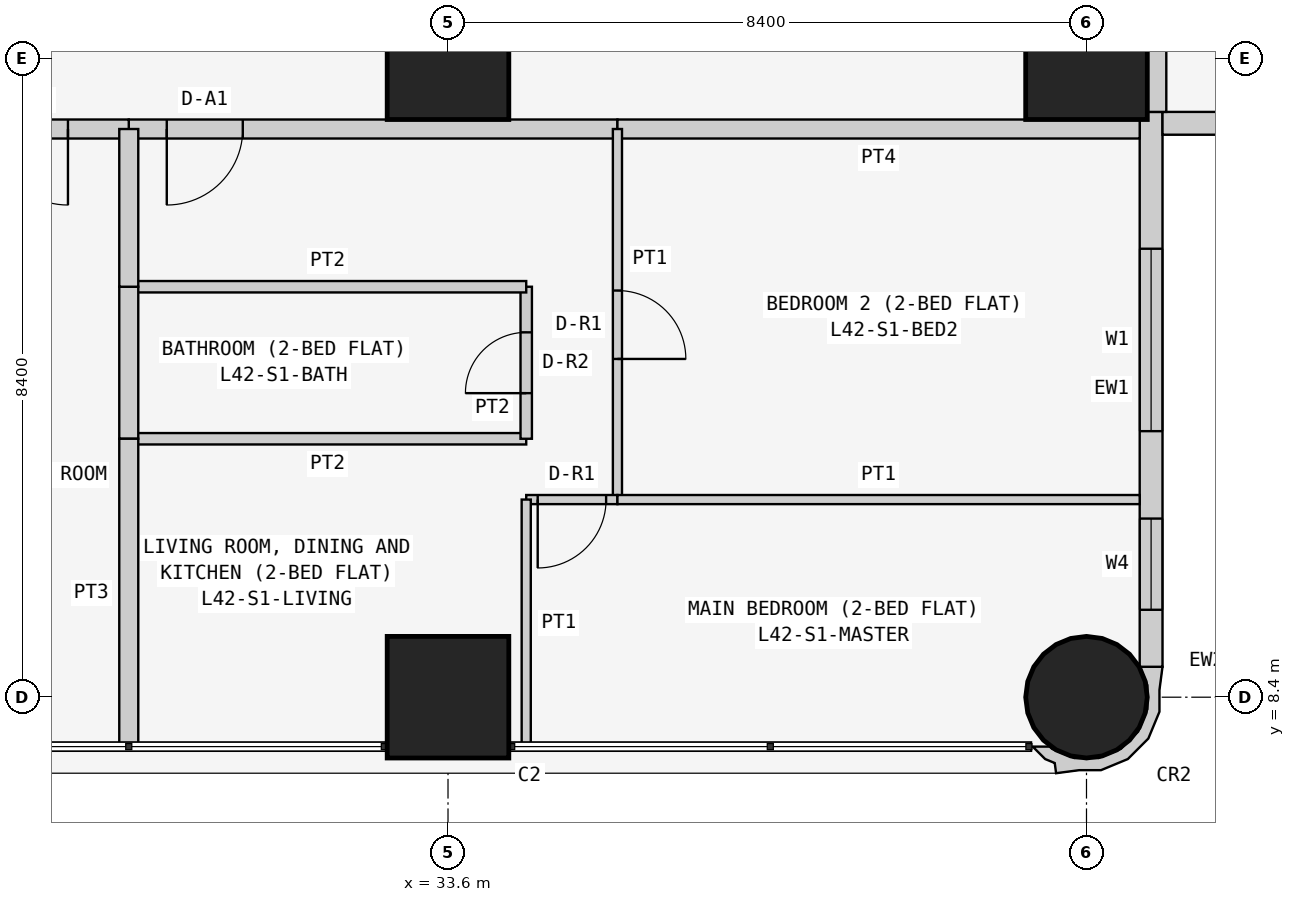
"""IFC4 building model, lengths in metres.
Left out: names, types, materials, properties, quantities, classifications, styles, units other than length and angle.
Written with IfcOpenShell. Run it as: python <this file> out.ifc"""

import sys

from ifc_helpers import new_model, si_unit, direction, frame, frame_2d, origin, origin_2d, place, context, subcontext, project, spatial, polyline, rectangle, circle, outline, extrude, element, fill, save


model = new_model("IFC4")
c1 = context("Model", 3, precision=1e-05, world=origin(), true_north=direction((0.0, 1.0)))
c2 = subcontext(c1, "Body", "Model", "MODEL_VIEW")
j1 = project(units=[si_unit("LENGTHUNIT", "METRE"), si_unit("PLANEANGLEUNIT", "RADIAN")], contexts=[c1])
p1 = place(None, origin())
s1 = spatial("IfcSite", under=j1, at=p1, CompositionType="ELEMENT")
p2 = place(p1, origin())
s2 = spatial("IfcBuilding", under=s1, at=p2, CompositionType="ELEMENT")
p3 = place(p2, frame((0.0, 0.0, 162.9)))
s3 = spatial("IfcBuildingStorey", under=s2, at=p3, CompositionType="ELEMENT", Elevation=162.9)
for number, where, z_axis, x_axis in (
    (1, (33.6, 8.4, 0.0), (0.0, 0.0, 1.0), (1.0, 0.0, 0.0)),
    (2, (33.6, 16.8, 0.0), (0.0, 0.0, 1.0), (1.0, 0.0, 0.0)),
):
    element("IfcColumn", number, at=place(p3, frame(where, z_axis=z_axis, x_axis=x_axis)), inside=s3, PredefinedType="COLUMN", context=c2, shape_type="SweptSolid", body=[
        extrude(rectangle(XDim=1.6, YDim=1.6, at=origin_2d()), origin(), (0.0, 0.0, 1.0), 3.6),
    ])
p4 = place(p3, frame((42.0, 8.4, 0.0), z_axis=(0.0, 0.0, 1.0), x_axis=(1.0, 0.0, 0.0)))
e3 = element("IfcColumn", 3, at=p4, inside=s3, PredefinedType="COLUMN", context=c2, shape_type="SweptSolid", body=[
    extrude(circle(Radius=0.8, at=origin_2d()), origin(), (0.0, 0.0, 1.0), 3.6),
])
p5 = place(p3, frame((42.0, 16.8, 0.0), z_axis=(0.0, 0.0, 1.0), x_axis=(1.0, 0.0, 0.0)))
e4 = element("IfcColumn", 4, at=p5, inside=s3, PredefinedType="COLUMN", context=c2, shape_type="SweptSolid", body=[
    extrude(rectangle(XDim=1.6, YDim=1.6, at=origin_2d()), origin(), (0.0, 0.0, 1.0), 3.6),
])
p6 = place(p3, frame((42.85, 8.8, 0.0), z_axis=(0.0, 0.0, 1.0), x_axis=(0.0, 1.0, 0.0)))
e5 = element("IfcWall", 5, at=p6, inside=s3, PredefinedType="SOLIDWALL", context=c2, shape_type="SweptSolid", body=[
    extrude(rectangle(XDim=7.3, YDim=0.3, at=frame_2d((3.65, 0.0))), origin(), (0.0, 0.0, 1.0), 3.45),
])
p7 = place(p6, frame((3.1, 0.0, 0.9)))
e6 = element("IfcOpeningElement", 6, at=p7, cuts=e5, PredefinedType="OPENING", context=c2, shape_type="SweptSolid", body=[
    extrude(rectangle(XDim=2.4, YDim=1.5, at=frame_2d((1.2, 0.75))), frame((0.0, 0.16, 0.0), z_axis=(0.0, -1.0, 0.0), x_axis=(1.0, 0.0, 0.0)), (0.0, 0.0, 1.0), 0.32),
])
p8 = place(p6, frame((0.75, 0.0, 0.9)))
e7 = element("IfcOpeningElement", 7, at=p8, cuts=e5, PredefinedType="OPENING", context=c2, shape_type="SweptSolid", body=[
    extrude(rectangle(XDim=1.2, YDim=1.5, at=frame_2d((0.6, 0.75))), frame((0.0, 0.16, 0.0), z_axis=(0.0, -1.0, 0.0), x_axis=(1.0, 0.0, 0.0)), (0.0, 0.0, 1.0), 0.32),
])
p9 = place(p3, frame((43.0, 15.95, 0.0), z_axis=(0.0, 0.0, 1.0), x_axis=(1.0, 0.0, 0.0)))
e8 = element("IfcWall", 8, at=p9, inside=s3, PredefinedType="SOLIDWALL", context=c2, shape_type="SweptSolid", body=[
    extrude(rectangle(XDim=15.4, YDim=0.3, at=frame_2d((7.7, 0.0))), origin(), (0.0, 0.0, 1.0), 3.45),
])
p10 = place(p9, frame((1.2, 0.0, 0.9)))
e9 = element("IfcOpeningElement", 9, at=p10, cuts=e8, PredefinedType="OPENING", context=c2, shape_type="SweptSolid", body=[
    extrude(rectangle(XDim=1.8, YDim=1.5, at=frame_2d((0.9, 0.75))), frame((0.0, 0.16, 0.0), z_axis=(0.0, -1.0, 0.0), x_axis=(1.0, 0.0, 0.0)), (0.0, 0.0, 1.0), 0.32),
])
p11 = place(p9, frame((4.95, 0.0, 1.5)))
e10 = element("IfcOpeningElement", 10, at=p11, cuts=e8, PredefinedType="OPENING", context=c2, shape_type="SweptSolid", body=[
    extrude(rectangle(XDim=0.9, YDim=0.7, at=frame_2d((0.45, 0.35))), frame((0.0, 0.16, 0.0), z_axis=(0.0, -1.0, 0.0), x_axis=(1.0, 0.0, 0.0)), (0.0, 0.0, 1.0), 0.32),
])
p12 = place(p9, frame((8.5, 0.0, 0.9)))
e11 = element("IfcOpeningElement", 11, at=p12, cuts=e8, PredefinedType="OPENING", context=c2, shape_type="SweptSolid", body=[
    extrude(rectangle(XDim=1.8, YDim=1.5, at=frame_2d((0.9, 0.75))), frame((0.0, 0.16, 0.0), z_axis=(0.0, -1.0, 0.0), x_axis=(1.0, 0.0, 0.0)), (0.0, 0.0, 1.0), 0.32),
])
p13 = place(p9, frame((12.5, 0.0, 0.0)))
e12 = element("IfcOpeningElement", 12, at=p13, cuts=e8, PredefinedType="OPENING", context=c2, shape_type="SweptSolid", body=[
    extrude(rectangle(XDim=0.9, YDim=2.4, at=frame_2d((0.45, 1.2))), frame((0.0, 0.16, 0.0), z_axis=(0.0, -1.0, 0.0), x_axis=(1.0, 0.0, 0.0)), (0.0, 0.0, 1.0), 0.32),
])
p14 = place(p9, frame((13.5, 0.0, 0.9)))
e13 = element("IfcOpeningElement", 13, at=p14, cuts=e8, PredefinedType="OPENING", context=c2, shape_type="SweptSolid", body=[
    extrude(rectangle(XDim=1.2, YDim=1.5, at=frame_2d((0.6, 0.75))), frame((0.0, 0.16, 0.0), z_axis=(0.0, -1.0, 0.0), x_axis=(1.0, 0.0, 0.0)), (0.0, 0.0, 1.0), 0.32),
])
p15 = place(p3, frame((41.352, 7.805, 0.0), z_axis=(0.0, 0.0, 1.0), x_axis=(0.343276641956, -0.93923434088, 0.0)))
e14 = element("IfcWall", 14, at=p15, inside=s3, PredefinedType="SOLIDWALL", context=c2, shape_type="SweptSolid", body=[
    extrude(outline(polyline([(-0.369, 1.89), (-0.509, 1.621), (-0.49, 1.615), (-0.479, 1.609), (-0.211, 1.62), (0.088, 1.511), (0.323, 1.295), (0.457, 1.006), (0.47, 0.688), (0.361, 0.389), (0.145, 0.154), (0.108, 0.136), (0.031, -0.075), (0.241, 0.023), (0.333, 0.124), (0.465, 0.094), (0.532, 0.393), (0.631, 0.663), (0.614, 1.044), (0.453, 1.391), (0.172, 1.649), (-0.097, 1.748), (-0.369, 1.89)])), origin(), (0.0, 0.0, 1.0), 3.45),
])
p16 = place(p3, frame((42.925, 22.571, 0.0), z_axis=(0.0, 0.0, 1.0), x_axis=(0.0, -1.0, 0.0)))
e15 = element("IfcWall", 15, at=p16, inside=s3, PredefinedType="PARTITIONING", context=c2, shape_type="SweptSolid", body=[
    extrude(rectangle(XDim=6.471, YDim=0.25, at=frame_2d((3.235, 0.0))), origin(), (0.0, 0.0, 1.0), 3.45),
])
p17 = place(p3, frame((35.829, 15.875, 0.0), z_axis=(0.0, 0.0, 1.0), x_axis=(-1.0, 0.0, 0.0)))
e16 = element("IfcWall", 16, at=p17, inside=s3, PredefinedType="PARTITIONING", context=c2, shape_type="SweptSolid", body=[
    extrude(rectangle(XDim=6.429, YDim=0.25, at=frame_2d((3.215, 0.0))), origin(), (0.0, 0.0, 1.0), 3.45),
])
p18 = place(p17, frame((4.929, 0.0, 0.0)))
e17 = element("IfcOpeningElement", 17, at=p18, cuts=e16, PredefinedType="OPENING", context=c2, shape_type="SweptSolid", body=[
    extrude(rectangle(XDim=1.0, YDim=2.1, at=frame_2d((0.5, 1.05))), frame((0.0, 0.135, 0.0), z_axis=(0.0, -1.0, 0.0), x_axis=(1.0, 0.0, 0.0)), (0.0, 0.0, 1.0), 0.27),
])
p19 = place(p3, frame((42.7, 15.875, 0.0), z_axis=(0.0, 0.0, 1.0), x_axis=(-1.0, 0.0, 0.0)))
e18 = element("IfcWall", 18, at=p19, inside=s3, PredefinedType="PARTITIONING", context=c2, shape_type="SweptSolid", body=[
    extrude(rectangle(XDim=6.871, YDim=0.25, at=frame_2d((3.436, 0.0))), origin(), (0.0, 0.0, 1.0), 3.45),
])
p20 = place(p3, frame((29.4, 15.875, 0.0), z_axis=(0.0, 0.0, 1.0), x_axis=(-1.0, 0.0, 0.0)))
e19 = element("IfcWall", 19, at=p20, inside=s3, PredefinedType="PARTITIONING", context=c2, shape_type="SweptSolid", body=[
    extrude(rectangle(XDim=2.6, YDim=0.25, at=frame_2d((1.3, 0.0))), origin(), (0.0, 0.0, 1.0), 3.45),
])
p21 = place(p20, frame((0.8, 0.0, 0.0)))
e20 = element("IfcOpeningElement", 20, at=p21, cuts=e19, PredefinedType="OPENING", context=c2, shape_type="SweptSolid", body=[
    extrude(rectangle(XDim=1.0, YDim=2.1, at=frame_2d((0.5, 1.05))), frame((0.0, 0.135, 0.0), z_axis=(0.0, -1.0, 0.0), x_axis=(1.0, 0.0, 0.0)), (0.0, 0.0, 1.0), 0.27),
])
p22 = place(p3, frame((29.4, 11.8, 0.0), z_axis=(0.0, 0.0, 1.0), x_axis=(1.0, 0.0, 0.0)))
e21 = element("IfcWall", 21, at=p22, inside=s3, PredefinedType="PARTITIONING", context=c2, shape_type="SweptSolid", body=[
    extrude(rectangle(XDim=5.229, YDim=0.15, at=frame_2d((2.615, 0.0))), origin(), (0.0, 0.0, 1.0), 3.45),
])
p23 = place(p3, frame((34.629, 11.8, 0.0), z_axis=(0.0, 0.0, 1.0), x_axis=(0.0, 1.0, 0.0)))
e22 = element("IfcWall", 22, at=p23, inside=s3, PredefinedType="PARTITIONING", context=c2, shape_type="SweptSolid", body=[
    extrude(rectangle(XDim=2.0, YDim=0.15, at=frame_2d((1.0, 0.0))), origin(), (0.0, 0.0, 1.0), 3.45),
])
p24 = place(p23, frame((0.6, 0.0, 0.0)))
e23 = element("IfcOpeningElement", 23, at=p24, cuts=e22, PredefinedType="OPENING", context=c2, shape_type="SweptSolid", body=[
    extrude(rectangle(XDim=0.8, YDim=2.1, at=frame_2d((0.4, 1.05))), frame((0.0, 0.085, 0.0), z_axis=(0.0, -1.0, 0.0), x_axis=(1.0, 0.0, 0.0)), (0.0, 0.0, 1.0), 0.17),
])
p25 = place(p3, frame((34.629, 13.8, 0.0), z_axis=(0.0, 0.0, 1.0), x_axis=(-1.0, 0.0, 0.0)))
e24 = element("IfcWall", 24, at=p25, inside=s3, PredefinedType="PARTITIONING", context=c2, shape_type="SweptSolid", body=[
    extrude(rectangle(XDim=5.229, YDim=0.15, at=frame_2d((2.615, 0.0))), origin(), (0.0, 0.0, 1.0), 3.45),
])
p26 = place(p3, frame((29.4, 13.8, 0.0), z_axis=(0.0, 0.0, 1.0), x_axis=(0.0, -1.0, 0.0)))
e25 = element("IfcWall", 25, at=p26, inside=s3, PredefinedType="PARTITIONING", context=c2, shape_type="SweptSolid", body=[
    extrude(rectangle(XDim=2.0, YDim=0.25, at=frame_2d((1.0, 0.0))), origin(), (0.0, 0.0, 1.0), 2.848),
])
p27 = place(p3, frame((35.829, 15.875, 0.0), z_axis=(0.0, 0.0, 1.0), x_axis=(0.0, -1.0, 0.0)))
e26 = element("IfcWall", 26, at=p27, inside=s3, PredefinedType="PARTITIONING", context=c2, shape_type="SweptSolid", body=[
    extrude(rectangle(XDim=4.875, YDim=0.12, at=frame_2d((2.438, 0.0))), origin(), (0.0, 0.0, 1.0), 3.45),
])
p28 = place(p27, frame((2.125, 0.0, 0.0)))
e27 = element("IfcOpeningElement", 27, at=p28, cuts=e26, PredefinedType="OPENING", context=c2, shape_type="SweptSolid", body=[
    extrude(rectangle(XDim=0.9, YDim=2.1, at=frame_2d((0.45, 1.05))), frame((0.0, 0.07, 0.0), z_axis=(0.0, -1.0, 0.0), x_axis=(1.0, 0.0, 0.0)), (0.0, 0.0, 1.0), 0.14),
])
p29 = place(p3, frame((35.829, 11.0, 0.0), z_axis=(0.0, 0.0, 1.0), x_axis=(-1.0, 0.0, 0.0)))
e28 = element("IfcWall", 28, at=p29, inside=s3, PredefinedType="PARTITIONING", context=c2, shape_type="SweptSolid", body=[
    extrude(rectangle(XDim=1.2, YDim=0.12, at=frame_2d((0.6, 0.0))), origin(), (0.0, 0.0, 1.0), 3.45),
])
p30 = place(p29, frame((0.149, 0.0, 0.0)))
e29 = element("IfcOpeningElement", 29, at=p30, cuts=e28, PredefinedType="OPENING", context=c2, shape_type="SweptSolid", body=[
    extrude(rectangle(XDim=0.9, YDim=2.1, at=frame_2d((0.45, 1.05))), frame((0.0, 0.07, 0.0), z_axis=(0.0, -1.0, 0.0), x_axis=(1.0, 0.0, 0.0)), (0.0, 0.0, 1.0), 0.14),
])
p31 = place(p3, frame((34.629, 11.0, 0.0), z_axis=(0.0, 0.0, 1.0), x_axis=(0.0, -1.0, 0.0)))
e30 = element("IfcWall", 30, at=p31, inside=s3, PredefinedType="PARTITIONING", context=c2, shape_type="SweptSolid", body=[
    extrude(rectangle(XDim=3.25, YDim=0.12, at=frame_2d((1.625, 0.0))), origin(), (0.0, 0.0, 1.0), 3.45),
])
p32 = place(p3, frame((29.4, 7.75, 0.0), z_axis=(0.0, 0.0, 1.0), x_axis=(0.0, 1.0, 0.0)))
e31 = element("IfcWall", 31, at=p32, inside=s3, PredefinedType="PARTITIONING", context=c2, shape_type="SweptSolid", body=[
    extrude(rectangle(XDim=4.05, YDim=0.25, at=frame_2d((2.025, 0.0))), origin(), (0.0, 0.0, 1.0), 2.848),
])
p33 = place(p3, frame((29.4, 13.8, 0.0), z_axis=(0.0, 0.0, 1.0), x_axis=(0.0, 1.0, 0.0)))
e32 = element("IfcWall", 32, at=p33, inside=s3, PredefinedType="PARTITIONING", context=c2, shape_type="SweptSolid", body=[
    extrude(rectangle(XDim=2.075, YDim=0.25, at=frame_2d((1.038, 0.0))), origin(), (0.0, 0.0, 1.0), 2.848),
])
p34 = place(p3, frame((35.829, 11.0, 0.0), z_axis=(0.0, 0.0, 1.0), x_axis=(1.0, 0.0, 0.0)))
e33 = element("IfcWall", 33, at=p34, inside=s3, PredefinedType="PARTITIONING", context=c2, shape_type="SweptSolid", body=[
    extrude(rectangle(XDim=6.871, YDim=0.12, at=frame_2d((3.436, 0.0))), origin(), (0.0, 0.0, 1.0), 3.45),
])
p35 = place(p7, origin())
e34 = element("IfcWindow", 34, at=p35, inside=s3, PartitioningType="SINGLE_PANEL", PredefinedType="WINDOW", context=c2, shape_type="SweptSolid", body=[
    extrude(rectangle(XDim=2.4, YDim=1.5, at=frame_2d((1.2, 0.75))), frame((0.0, 0.03, 0.0), z_axis=(0.0, -1.0, 0.0), x_axis=(1.0, 0.0, 0.0)), (0.0, 0.0, 1.0), 0.06),
])
fill(e6, e34)
p36 = place(p8, origin())
e35 = element("IfcWindow", 35, at=p36, inside=s3, PartitioningType="SINGLE_PANEL", PredefinedType="WINDOW", context=c2, shape_type="SweptSolid", body=[
    extrude(rectangle(XDim=1.2, YDim=1.5, at=frame_2d((0.6, 0.75))), frame((0.0, 0.03, 0.0), z_axis=(0.0, -1.0, 0.0), x_axis=(1.0, 0.0, 0.0)), (0.0, 0.0, 1.0), 0.06),
])
fill(e7, e35)
p37 = place(p18, origin())
e36 = element("IfcDoor", 36, at=p37, inside=s3, OperationType="SINGLE_SWING_RIGHT", PredefinedType="DOOR", context=c2, shape_type="SweptSolid", body=[
    extrude(rectangle(XDim=1.0, YDim=2.1, at=frame_2d((0.5, 1.05))), frame((0.0, 0.025, 0.0), z_axis=(0.0, -1.0, 0.0), x_axis=(1.0, 0.0, 0.0)), (0.0, 0.0, 1.0), 0.05),
])
fill(e17, e36)
p38 = place(p24, origin())
e37 = element("IfcDoor", 37, at=p38, inside=s3, OperationType="SINGLE_SWING_LEFT", PredefinedType="DOOR", context=c2, shape_type="SweptSolid", body=[
    extrude(rectangle(XDim=0.8, YDim=2.1, at=frame_2d((0.4, 1.05))), frame((0.0, 0.025, 0.0), z_axis=(0.0, -1.0, 0.0), x_axis=(1.0, 0.0, 0.0)), (0.0, 0.0, 1.0), 0.05),
])
fill(e23, e37)
p39 = place(p28, origin())
e38 = element("IfcDoor", 38, at=p39, inside=s3, OperationType="SINGLE_SWING_RIGHT", PredefinedType="DOOR", context=c2, shape_type="SweptSolid", body=[
    extrude(rectangle(XDim=0.9, YDim=2.1, at=frame_2d((0.45, 1.05))), frame((0.0, 0.025, 0.0), z_axis=(0.0, -1.0, 0.0), x_axis=(1.0, 0.0, 0.0)), (0.0, 0.0, 1.0), 0.05),
])
fill(e27, e38)
p40 = place(p30, origin())
e39 = element("IfcDoor", 39, at=p40, inside=s3, OperationType="SINGLE_SWING_RIGHT", PredefinedType="DOOR", context=c2, shape_type="SweptSolid", body=[
    extrude(rectangle(XDim=0.9, YDim=2.1, at=frame_2d((0.45, 1.05))), frame((0.0, 0.025, 0.0), z_axis=(0.0, -1.0, 0.0), x_axis=(1.0, 0.0, 0.0)), (0.0, 0.0, 1.0), 0.05),
])
fill(e29, e39)
p41 = place(p21, origin())
e40 = element("IfcDoor", 40, at=p41, inside=s3, OperationType="SINGLE_SWING_LEFT", PredefinedType="DOOR", context=c2, shape_type="SweptSolid", body=[
    extrude(rectangle(XDim=1.0, YDim=2.1, at=frame_2d((0.5, 1.05))), frame((0.0, 0.025, 0.0), z_axis=(0.0, -1.0, 0.0), x_axis=(1.0, 0.0, 0.0)), (0.0, 0.0, 1.0), 0.05),
])
fill(e20, e40)
save(model, sys.argv[1])
